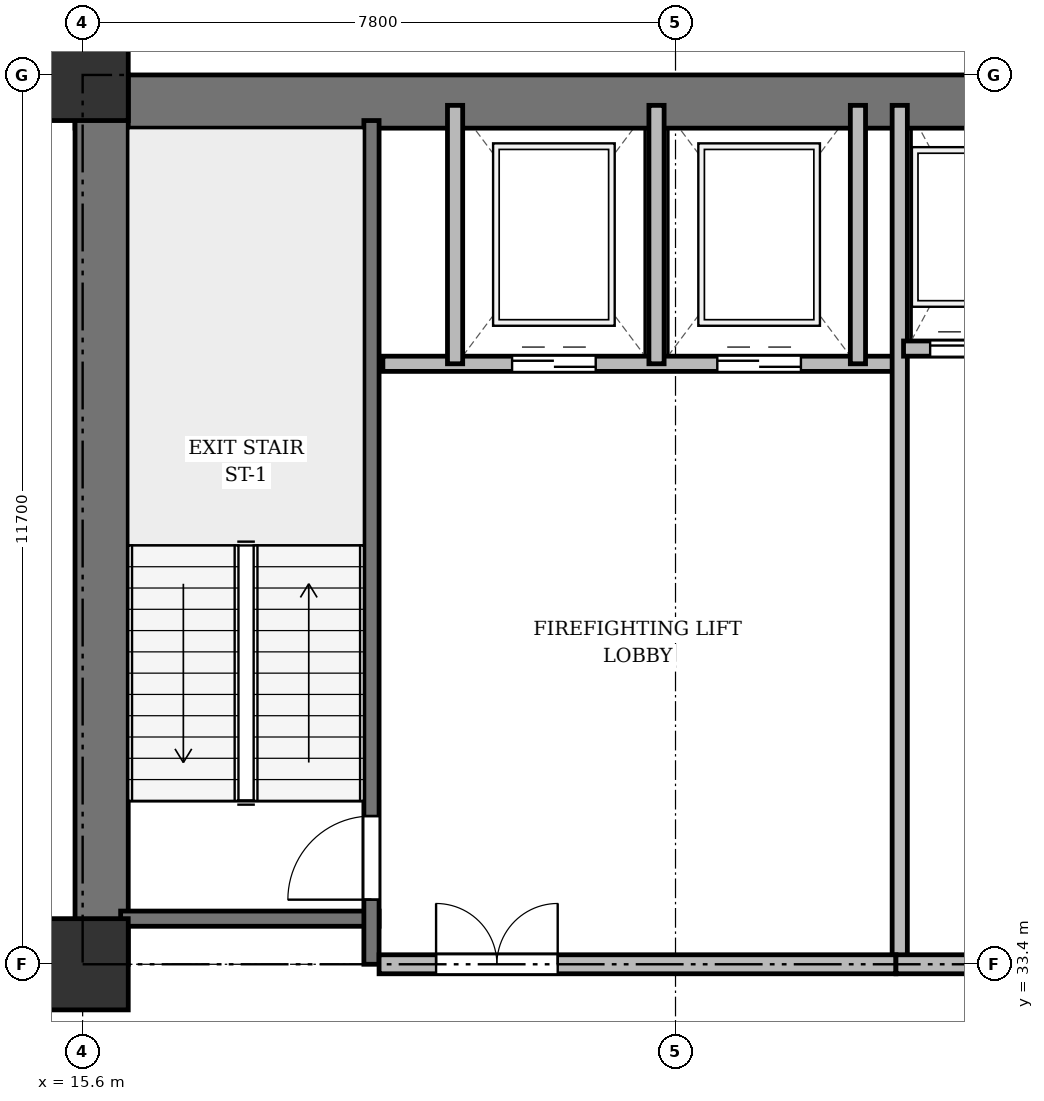
"""IFC4 building model, lengths in metres.
Left out: names, types, materials, properties, quantities, classifications, styles, units other than length and angle.
Written with IfcOpenShell. Run it as: python <this file> out.ifc"""

import sys

from ifc_helpers import new_model, si_unit, direction, frame, frame_2d, origin, origin_2d, place, context, subcontext, project, spatial, rectangle, extrude, source, transform, mapped, element, fill, save


model = new_model("IFC4")
c1 = context("Model", 3, precision=1e-05, world=origin(), true_north=direction((0.0, 1.0)))
c2 = subcontext(c1, "Body", "Model", "MODEL_VIEW")
j1 = project(units=[si_unit("LENGTHUNIT", "METRE"), si_unit("PLANEANGLEUNIT", "RADIAN")], contexts=[c1])
p1 = place(None, origin())
s1 = spatial("IfcSite", under=j1, at=p1, CompositionType="ELEMENT")
p2 = place(p1, origin())
s2 = spatial("IfcBuilding", under=s1, at=p2, CompositionType="ELEMENT")
p3 = place(p2, frame((0.0, 0.0, 5.2)))
s3 = spatial("IfcBuildingStorey", under=s2, at=p3, CompositionType="ELEMENT", Elevation=5.2)
m1 = source(origin(), c2, "Body", "SweptSolid", [
    extrude(rectangle(XDim=1.2, YDim=1.2, at=origin_2d()), origin(), (0.0, 0.0, 1.0), 4.5),
])
for number, where, z_axis, x_axis in (
    (1, (15.6, 33.4, 0.0), (0.0, 0.0, 1.0), (1.0, 0.0, 0.0)),
    (2, (15.6, 45.1, 0.0), (0.0, 0.0, 1.0), (1.0, 0.0, 0.0)),
):
    element("IfcColumn", number, at=place(p3, frame(where, z_axis=z_axis, x_axis=x_axis)), inside=s3, PredefinedType="COLUMN", context=c2, shape_type="MappedRepresentation", body=[
        mapped(m1, transform((0.0, 0.0, 0.0), x_axis=(1.0, 0.0, 0.0), y_axis=(0.0, 1.0, 0.0), z_axis=(0.0, 0.0, 1.0), scale=1.0)),
    ])
p4 = place(p3, frame((15.5, 44.75, 0.0), z_axis=(0.0, 0.0, 1.0), x_axis=(1.0, 0.0, 0.0)))
e3 = element("IfcWall", 3, at=p4, inside=s3, PredefinedType="SHEAR", context=c2, shape_type="SweptSolid", body=[
    extrude(rectangle(XDim=43.4, YDim=0.7, at=frame_2d((21.7, 0.0))), origin(), (0.0, 0.0, 1.0), 4.2),
])
p5 = place(p3, frame((15.85, 33.4, 0.0), z_axis=(0.0, 0.0, 1.0), x_axis=(0.0, 1.0, 0.0)))
e4 = element("IfcWall", 4, at=p5, inside=s3, PredefinedType="SHEAR", context=c2, shape_type="SweptSolid", body=[
    extrude(rectangle(XDim=11.7, YDim=0.7, at=frame_2d((5.85, 0.0))), origin(), (0.0, 0.0, 1.0), 4.2),
])
p6 = place(p3, frame((16.1, 34.0, 0.0), z_axis=(0.0, 0.0, 1.0), x_axis=(1.0, 0.0, 0.0)))
e5 = element("IfcWall", 5, at=p6, inside=s3, PredefinedType="SHEAR", context=c2, shape_type="SweptSolid", body=[
    extrude(rectangle(XDim=3.4, YDim=0.2, at=frame_2d((1.7, 0.0))), origin(), (0.0, 0.0, 1.0), 4.2),
])
p7 = place(p3, frame((19.4, 33.4, 0.0), z_axis=(0.0, 0.0, 1.0), x_axis=(0.0, 1.0, 0.0)))
e6 = element("IfcWall", 6, at=p7, inside=s3, PredefinedType="SHEAR", context=c2, shape_type="SweptSolid", body=[
    extrude(rectangle(XDim=11.1, YDim=0.2, at=frame_2d((5.55, 0.0))), origin(), (0.0, 0.0, 1.0), 4.2),
])
p8 = place(p7, frame((0.85, 0.0, 0.0)))
e7 = element("IfcOpeningElement", 7, at=p8, cuts=e6, PredefinedType="OPENING", context=c2, shape_type="SweptSolid", body=[
    extrude(rectangle(XDim=1.1, YDim=2.15, at=frame_2d((0.55, 1.075))), frame((0.0, 0.11, 0.0), z_axis=(0.0, -1.0, 0.0), x_axis=(1.0, 0.0, 0.0)), (0.0, 0.0, 1.0), 0.22),
])
p9 = place(p3, frame((19.55, 41.3, 0.0), z_axis=(0.0, 0.0, 1.0), x_axis=(1.0, 0.0, 0.0)))
e8 = element("IfcWall", 8, at=p9, inside=s3, PredefinedType="SOLIDWALL", context=c2, shape_type="SweptSolid", body=[
    extrude(rectangle(XDim=6.75, YDim=0.2, at=frame_2d((3.375, 0.0))), origin(), (0.0, 0.0, 1.0), 4.2),
])
p10 = place(p9, frame((1.7, 0.0, 0.0)))
e9 = element("IfcOpeningElement", 9, at=p10, cuts=e8, PredefinedType="OPENING", context=c2, shape_type="SweptSolid", body=[
    extrude(rectangle(XDim=1.1, YDim=2.15, at=frame_2d((0.55, 1.075))), frame((0.0, 0.11, 0.0), z_axis=(0.0, -1.0, 0.0), x_axis=(1.0, 0.0, 0.0)), (0.0, 0.0, 1.0), 0.22),
])
p11 = place(p9, frame((4.4, 0.0, 0.0)))
e10 = element("IfcOpeningElement", 10, at=p11, cuts=e8, PredefinedType="OPENING", context=c2, shape_type="SweptSolid", body=[
    extrude(rectangle(XDim=1.1, YDim=2.15, at=frame_2d((0.55, 1.075))), frame((0.0, 0.11, 0.0), z_axis=(0.0, -1.0, 0.0), x_axis=(1.0, 0.0, 0.0)), (0.0, 0.0, 1.0), 0.22),
])
for number, where, z_axis, x_axis in (
    (11, (20.5, 41.3, 0.0), (0.0, 0.0, 1.0), (0.0, 1.0, 0.0)),
    (12, (23.15, 41.3, 0.0), (0.0, 0.0, 1.0), (0.0, 1.0, 0.0)),
    (13, (25.8, 41.3, 0.0), (0.0, 0.0, 1.0), (0.0, 1.0, 0.0)),
):
    element("IfcWall", number, at=place(p3, frame(where, z_axis=z_axis, x_axis=x_axis)), inside=s3, PredefinedType="SOLIDWALL", context=c2, shape_type="SweptSolid", body=[
        extrude(rectangle(XDim=3.4, YDim=0.2, at=frame_2d((1.7, 0.0))), origin(), (0.0, 0.0, 1.0), 4.2),
    ])
p12 = place(p3, frame((26.35, 33.4, 0.0), z_axis=(0.0, 0.0, 1.0), x_axis=(0.0, 1.0, 0.0)))
e14 = element("IfcWall", 14, at=p12, inside=s3, PredefinedType="SOLIDWALL", context=c2, shape_type="SweptSolid", body=[
    extrude(rectangle(XDim=11.3, YDim=0.2, at=frame_2d((5.65, 0.0))), origin(), (0.0, 0.0, 1.0), 3.1),
])
p13 = place(p3, frame((19.5, 33.4, 0.0), z_axis=(0.0, 0.0, 1.0), x_axis=(1.0, 0.0, 0.0)))
e15 = element("IfcWall", 15, at=p13, inside=s3, PredefinedType="PARTITIONING", context=c2, shape_type="SweptSolid", body=[
    extrude(rectangle(XDim=6.8, YDim=0.25, at=frame_2d((3.4, 0.0))), origin(), (0.0, 0.0, 1.0), 3.1),
])
p14 = place(p13, frame((0.75, 0.0, 0.0)))
e16 = element("IfcOpeningElement", 16, at=p14, cuts=e15, PredefinedType="OPENING", context=c2, shape_type="SweptSolid", body=[
    extrude(rectangle(XDim=1.6, YDim=2.2, at=frame_2d((0.8, 1.1))), frame((0.0, 0.135, 0.0), z_axis=(0.0, -1.0, 0.0), x_axis=(1.0, 0.0, 0.0)), (0.0, 0.0, 1.0), 0.27),
])
p15 = place(p3, frame((26.4, 41.5, 0.0), z_axis=(0.0, 0.0, 1.0), x_axis=(1.0, 0.0, 0.0)))
e17 = element("IfcWall", 17, at=p15, inside=s3, PredefinedType="SOLIDWALL", context=c2, shape_type="SweptSolid", body=[
    extrude(rectangle(XDim=6.95, YDim=0.2, at=frame_2d((3.475, 0.0))), origin(), (0.0, 0.0, 1.0), 4.2),
])
p16 = place(p15, frame((0.35, 0.0, 0.0)))
e18 = element("IfcOpeningElement", 18, at=p16, cuts=e17, PredefinedType="OPENING", context=c2, shape_type="SweptSolid", body=[
    extrude(rectangle(XDim=1.05, YDim=2.15, at=frame_2d((0.525, 1.075))), frame((0.0, 0.11, 0.0), z_axis=(0.0, -1.0, 0.0), x_axis=(1.0, 0.0, 0.0)), (0.0, 0.0, 1.0), 0.22),
])
p17 = place(p15, frame((2.05, 0.0, 0.0)))
e19 = element("IfcOpeningElement", 19, at=p17, cuts=e17, PredefinedType="OPENING", context=c2, shape_type="SweptSolid", body=[
    extrude(rectangle(XDim=1.05, YDim=2.15, at=frame_2d((0.525, 1.075))), frame((0.0, 0.11, 0.0), z_axis=(0.0, -1.0, 0.0), x_axis=(1.0, 0.0, 0.0)), (0.0, 0.0, 1.0), 0.22),
])
p18 = place(p15, frame((3.75, 0.0, 0.0)))
e20 = element("IfcOpeningElement", 20, at=p18, cuts=e17, PredefinedType="OPENING", context=c2, shape_type="SweptSolid", body=[
    extrude(rectangle(XDim=1.05, YDim=2.15, at=frame_2d((0.525, 1.075))), frame((0.0, 0.11, 0.0), z_axis=(0.0, -1.0, 0.0), x_axis=(1.0, 0.0, 0.0)), (0.0, 0.0, 1.0), 0.22),
])
p19 = place(p15, frame((5.45, 0.0, 0.0)))
e21 = element("IfcOpeningElement", 21, at=p19, cuts=e17, PredefinedType="OPENING", context=c2, shape_type="SweptSolid", body=[
    extrude(rectangle(XDim=1.05, YDim=2.15, at=frame_2d((0.525, 1.075))), frame((0.0, 0.11, 0.0), z_axis=(0.0, -1.0, 0.0), x_axis=(1.0, 0.0, 0.0)), (0.0, 0.0, 1.0), 0.22),
])
p20 = place(p3, frame((26.3, 33.4, 0.0), z_axis=(0.0, 0.0, 1.0), x_axis=(1.0, 0.0, 0.0)))
e22 = element("IfcWall", 22, at=p20, inside=s3, PredefinedType="PARTITIONING", context=c2, shape_type="SweptSolid", body=[
    extrude(rectangle(XDim=20.85, YDim=0.25, at=frame_2d((10.425, 0.0))), origin(), (0.0, 0.0, 1.0), 3.1),
])
p21 = place(p20, frame((9.2, 0.0, 0.0)))
e23 = element("IfcOpeningElement", 23, at=p21, cuts=e22, PredefinedType="OPENING", context=c2, shape_type="SweptSolid", body=[
    extrude(rectangle(XDim=1.6, YDim=2.2, at=frame_2d((0.8, 1.1))), frame((0.0, 0.135, 0.0), z_axis=(0.0, -1.0, 0.0), x_axis=(1.0, 0.0, 0.0)), (0.0, 0.0, 1.0), 0.27),
])
p22 = place(p3, frame((-2.95, 33.4, 0.0), z_axis=(0.0, 0.0, 1.0), x_axis=(1.0, 0.0, 0.0)))
e24 = element("IfcWall", 24, at=p22, inside=s3, PredefinedType="PARTITIONING", context=c2, shape_type="SweptSolid", body=[
    extrude(rectangle(XDim=18.75, YDim=0.15, at=frame_2d((9.375, 0.0))), origin(), (0.0, 0.0, 1.0), 3.1),
])
p23 = place(p22, frame((7.224, 0.0, 0.0)))
e25 = element("IfcOpeningElement", 25, at=p23, cuts=e24, PredefinedType="OPENING", context=c2, shape_type="SweptSolid", body=[
    extrude(rectangle(XDim=1.6, YDim=2.2, at=frame_2d((0.8, 1.1))), frame((0.0, 0.085, 0.0), z_axis=(0.0, -1.0, 0.0), x_axis=(1.0, 0.0, 0.0)), (0.0, 0.0, 1.0), 0.17),
])
m2 = source(origin(), c2, "Body", "SweptSolid", [
    extrude(rectangle(XDim=1.1, YDim=2.15, at=frame_2d((0.55, 1.075))), frame((0.0, 0.025, 0.0), z_axis=(0.0, -1.0, 0.0), x_axis=(1.0, 0.0, 0.0)), (0.0, 0.0, 1.0), 0.05),
])
p24 = place(p8, origin())
e26 = element("IfcDoor", 26, at=p24, inside=s3, OperationType="SINGLE_SWING_LEFT", PredefinedType="DOOR", context=c2, shape_type="MappedRepresentation", body=[
    mapped(m2, transform((0.0, 0.0, 0.0), x_axis=(1.0, 0.0, 0.0), y_axis=(0.0, 1.0, 0.0), z_axis=(0.0, 0.0, 1.0), scale=1.0)),
])
fill(e7, e26)
p25 = place(p10, origin())
e27 = element("IfcDoor", 27, at=p25, inside=s3, OperationType="DOUBLE_DOOR_SLIDING", PredefinedType="DOOR", context=c2, shape_type="MappedRepresentation", body=[
    mapped(m2, transform((0.0, 0.0, 0.0), x_axis=(1.0, 0.0, 0.0), y_axis=(0.0, 1.0, 0.0), z_axis=(0.0, 0.0, 1.0), scale=1.0)),
])
fill(e9, e27)
p26 = place(p11, origin())
e28 = element("IfcDoor", 28, at=p26, inside=s3, OperationType="DOUBLE_DOOR_SLIDING", PredefinedType="DOOR", context=c2, shape_type="MappedRepresentation", body=[
    mapped(m2, transform((0.0, 0.0, 0.0), x_axis=(1.0, 0.0, 0.0), y_axis=(0.0, 1.0, 0.0), z_axis=(0.0, 0.0, 1.0), scale=1.0)),
])
fill(e10, e28)
m3 = source(origin(), c2, "Body", "SweptSolid", [
    extrude(rectangle(XDim=1.6, YDim=2.2, at=frame_2d((0.8, 1.1))), frame((0.0, 0.025, 0.0), z_axis=(0.0, -1.0, 0.0), x_axis=(1.0, 0.0, 0.0)), (0.0, 0.0, 1.0), 0.05),
])
p27 = place(p14, origin())
e29 = element("IfcDoor", 29, at=p27, inside=s3, OperationType="DOUBLE_DOOR_SINGLE_SWING", PredefinedType="DOOR", context=c2, shape_type="MappedRepresentation", body=[
    mapped(m3, transform((0.0, 0.0, 0.0), x_axis=(1.0, 0.0, 0.0), y_axis=(0.0, 1.0, 0.0), z_axis=(0.0, 0.0, 1.0), scale=1.0)),
])
fill(e16, e29)
m4 = source(origin(), c2, "Body", "SweptSolid", [
    extrude(rectangle(XDim=1.05, YDim=2.15, at=frame_2d((0.525, 1.075))), frame((0.0, 0.025, 0.0), z_axis=(0.0, -1.0, 0.0), x_axis=(1.0, 0.0, 0.0)), (0.0, 0.0, 1.0), 0.05),
])
p28 = place(p16, origin())
e30 = element("IfcDoor", 30, at=p28, inside=s3, OperationType="DOUBLE_DOOR_SLIDING", PredefinedType="DOOR", context=c2, shape_type="MappedRepresentation", body=[
    mapped(m4, transform((0.0, 0.0, 0.0), x_axis=(1.0, 0.0, 0.0), y_axis=(0.0, 1.0, 0.0), z_axis=(0.0, 0.0, 1.0), scale=1.0)),
])
fill(e18, e30)
save(model, sys.argv[1])
